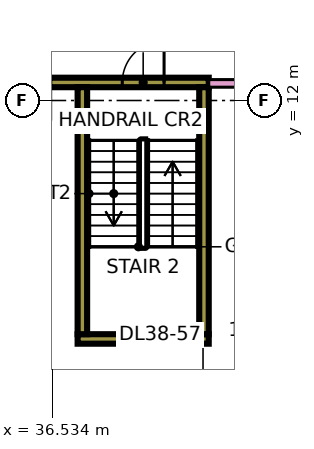
"""IFC4 building model, lengths in metres.
Left out: names, types, materials, properties, quantities, classifications, styles, units other than length and angle.
Written with IfcOpenShell. Run it as: python <this file> out.ifc"""

import sys

from ifc_helpers import new_model, si_unit, direction, frame, frame_2d, origin, place, context, subcontext, project, spatial, rectangle, extrude, element, fill, save


model = new_model("IFC4")
c1 = context("Model", 3, precision=1e-05, world=origin(), true_north=direction((0.0, 1.0)))
c2 = subcontext(c1, "Body", "Model", "MODEL_VIEW")
j1 = project(units=[si_unit("LENGTHUNIT", "METRE"), si_unit("PLANEANGLEUNIT", "RADIAN")], contexts=[c1])
p1 = place(None, origin())
s1 = spatial("IfcSite", under=j1, at=p1, CompositionType="ELEMENT")
p2 = place(p1, origin())
s2 = spatial("IfcBuilding", under=s1, at=p2, CompositionType="ELEMENT")
p3 = place(p2, frame((0.0, 0.0, 168.65)))
s3 = spatial("IfcBuildingStorey", under=s2, at=p3, CompositionType="ELEMENT", Elevation=168.65)
p4 = place(p3, frame((37.2, 5.725, 0.0), z_axis=(0.0, 0.0, 1.0), x_axis=(1.0, 0.0, 0.0)))
e1 = element("IfcWall", 1, at=p4, inside=s3, PredefinedType="SHEAR", context=c2, shape_type="SweptSolid", body=[
    extrude(rectangle(XDim=3.45, YDim=0.25, at=frame_2d((1.725, 0.0))), origin(), (0.0, 0.0, 1.0), 3.75),
])
p5 = place(p3, frame((36.45, 12.475, 0.0), z_axis=(0.0, 0.0, 1.0), x_axis=(1.0, 0.0, 0.0)))
e2 = element("IfcWall", 2, at=p5, inside=s3, PredefinedType="SHEAR", context=c2, shape_type="SweptSolid", body=[
    extrude(rectangle(XDim=4.2, YDim=0.25, at=frame_2d((2.1, 0.0))), origin(), (0.0, 0.0, 1.0), 3.75),
])
p6 = place(p5, frame((1.925, 0.0, 0.0)))
e3 = element("IfcOpeningElement", 3, at=p6, cuts=e2, PredefinedType="OPENING", context=c2, shape_type="SweptSolid", body=[
    extrude(rectangle(XDim=1.1, YDim=2.2, at=frame_2d((0.55, 1.1))), frame((0.0, 0.135, 0.0), z_axis=(0.0, -1.0, 0.0), x_axis=(1.0, 0.0, 0.0)), (0.0, 0.0, 1.0), 0.27),
])
for number, where, z_axis, x_axis in (
    (4, (37.325, 5.85, 0.0), (0.0, 0.0, 1.0), (0.0, 1.0, 0.0)),
    (5, (40.525, 5.85, 0.0), (0.0, 0.0, 1.0), (0.0, 1.0, 0.0)),
):
    element("IfcWall", number, at=place(p3, frame(where, z_axis=z_axis, x_axis=x_axis)), inside=s3, PredefinedType="SHEAR", context=c2, shape_type="SweptSolid", body=[
        extrude(rectangle(XDim=6.5, YDim=0.25, at=frame_2d((3.25, 0.0))), origin(), (0.0, 0.0, 1.0), 3.75),
    ])
p7 = place(p3, frame((40.65, 12.45, 0.0), z_axis=(0.0, 0.0, 1.0), x_axis=(1.0, 0.0, 0.0)))
e6 = element("IfcWall", 6, at=p7, inside=s3, PredefinedType="PARTITIONING", context=c2, shape_type="SweptSolid", body=[
    extrude(rectangle(XDim=22.276, YDim=0.2, at=frame_2d((11.138, 0.0))), origin(), (0.0, 0.0, 1.0), 3.35),
])
p8 = place(p7, frame((11.85, 0.0, 0.0)))
e7 = element("IfcOpeningElement", 7, at=p8, cuts=e6, PredefinedType="OPENING", context=c2, shape_type="SweptSolid", body=[
    extrude(rectangle(XDim=1.0, YDim=2.1, at=frame_2d((0.5, 1.05))), frame((0.0, 0.11, 0.0), z_axis=(0.0, -1.0, 0.0), x_axis=(1.0, 0.0, 0.0)), (0.0, 0.0, 1.0), 0.22),
])
p9 = place(p7, frame((1.05, 0.0, 0.0)))
e8 = element("IfcOpeningElement", 8, at=p9, cuts=e6, PredefinedType="OPENING", context=c2, shape_type="SweptSolid", body=[
    extrude(rectangle(XDim=1.0, YDim=2.1, at=frame_2d((0.5, 1.05))), frame((0.0, 0.11, 0.0), z_axis=(0.0, -1.0, 0.0), x_axis=(1.0, 0.0, 0.0)), (0.0, 0.0, 1.0), 0.22),
])
p10 = place(p6, frame((1.1, 0.0, 0.0), z_axis=(0.0, 0.0, 1.0), x_axis=(-1.0, 0.0, 0.0)))
e9 = element("IfcDoor", 9, at=p10, inside=s3, OperationType="SINGLE_SWING_RIGHT", PredefinedType="DOOR", context=c2, shape_type="SweptSolid", body=[
    extrude(rectangle(XDim=1.1, YDim=2.2, at=frame_2d((0.55, 1.1))), frame((0.0, 0.025, 0.0), z_axis=(0.0, -1.0, 0.0), x_axis=(1.0, 0.0, 0.0)), (0.0, 0.0, 1.0), 0.05),
])
fill(e3, e9)
save(model, sys.argv[1])
